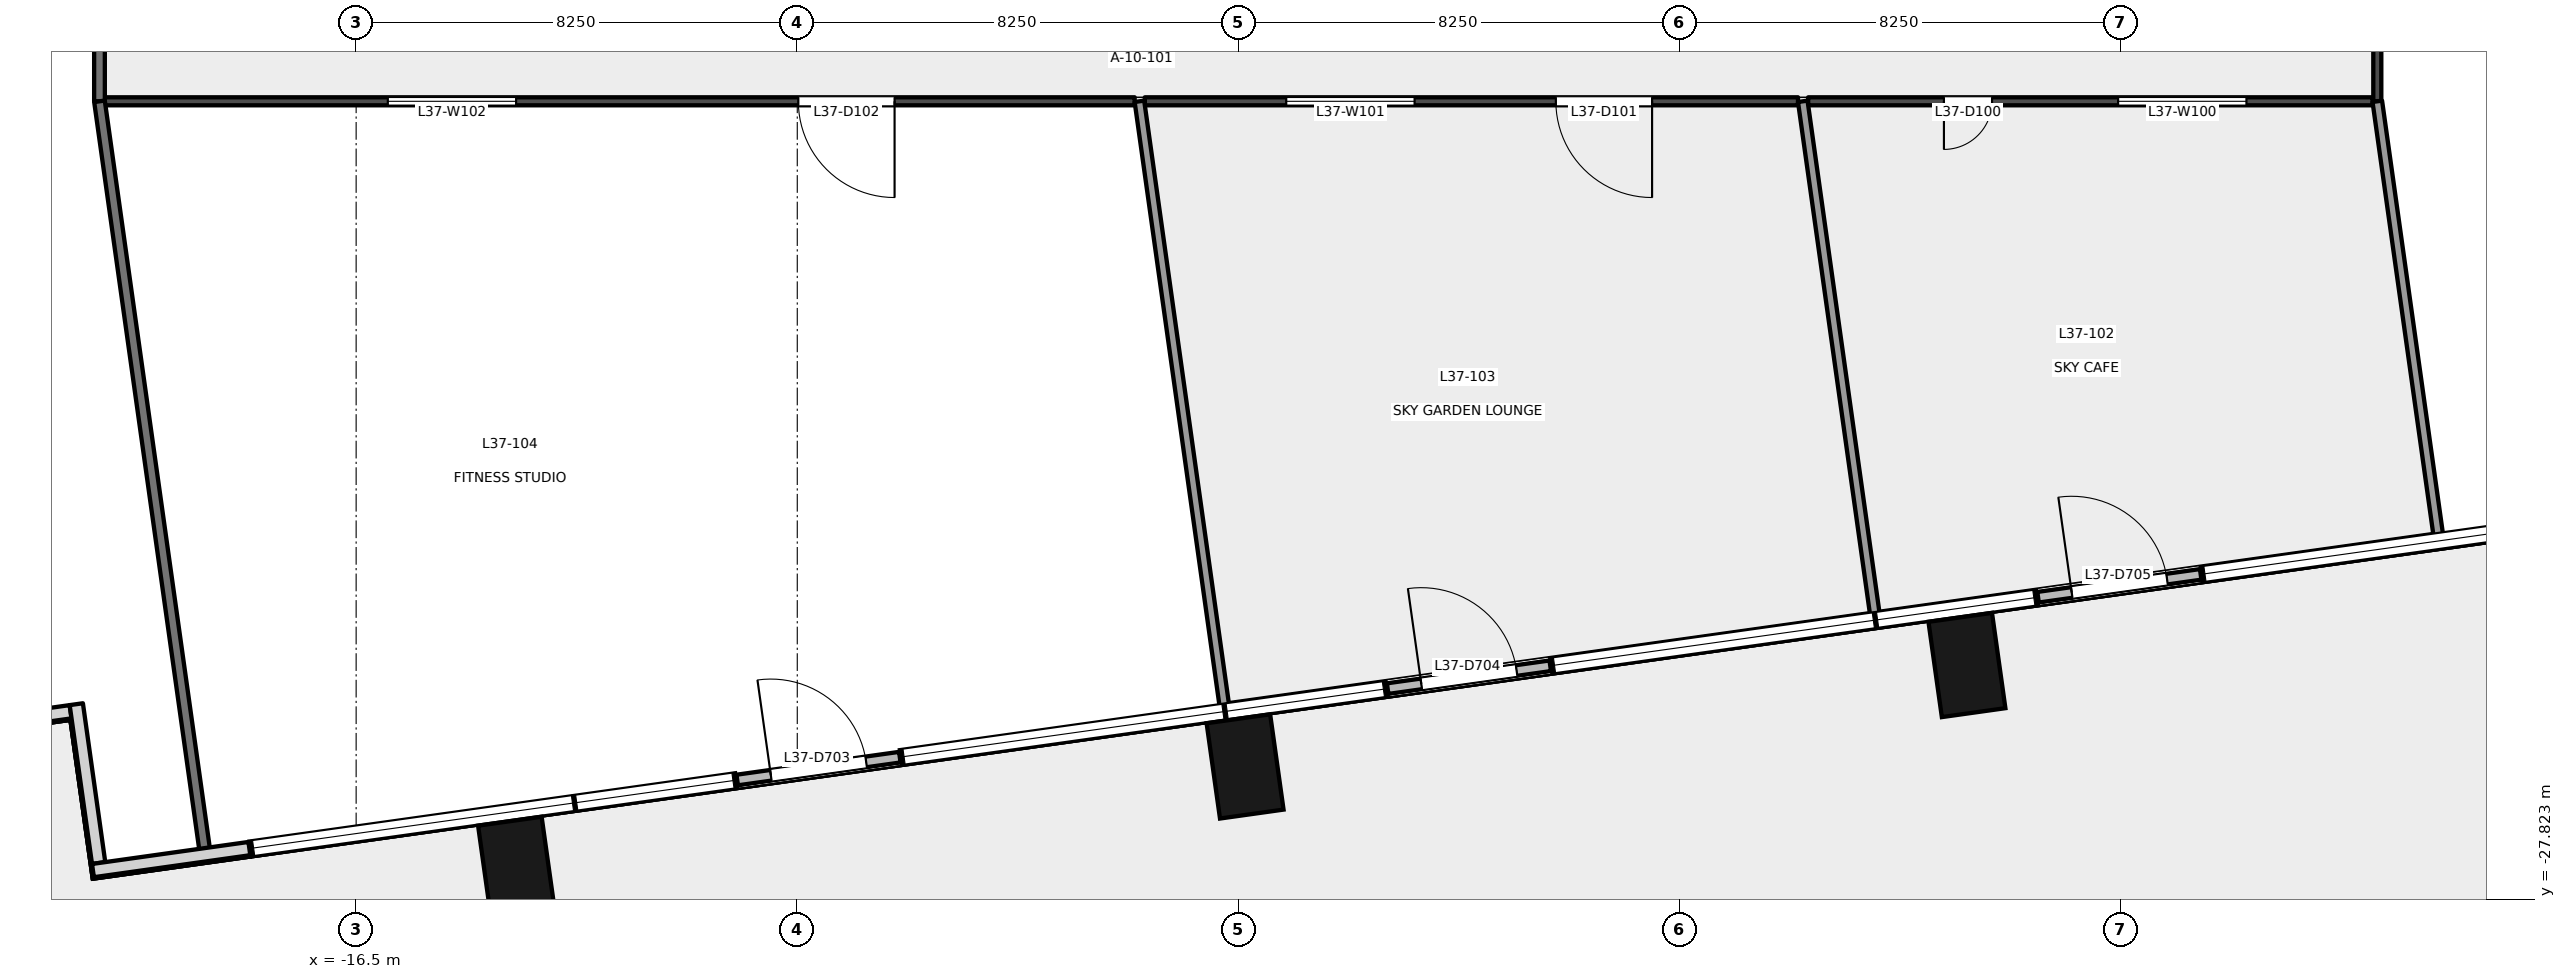
"""IFC4 building model, lengths in metres.
Left out: names, types, materials, properties, quantities, classifications, styles, units other than length and angle.
Written with IfcOpenShell. Run it as: python <this file> out.ifc"""

import sys

from ifc_helpers import new_model, si_unit, direction, frame, frame_2d, origin, origin_2d, place, context, subcontext, project, spatial, rectangle, extrude, element, fill, save


model = new_model("IFC4")
c1 = context("Model", 3, precision=1e-05, world=origin(), true_north=direction((0.0, 1.0)))
c2 = subcontext(c1, "Body", "Model", "MODEL_VIEW")
j1 = project(units=[si_unit("LENGTHUNIT", "METRE"), si_unit("PLANEANGLEUNIT", "RADIAN")], contexts=[c1])
p1 = place(None, origin())
s1 = spatial("IfcSite", under=j1, at=p1, CompositionType="ELEMENT")
p2 = place(p1, origin())
s2 = spatial("IfcBuilding", under=s1, at=p2, CompositionType="ELEMENT")
p3 = place(p2, frame((0.0, 0.0, 163.1)))
s3 = spatial("IfcBuildingStorey", under=s2, at=p3, CompositionType="ELEMENT", Elevation=163.1)
for number, where, z_axis, x_axis in (
    (1, (-13.5, -27.256, -0.2), (0.0, 0.0, 1.0), (0.99, 0.139, 0.0)),
    (2, (0.125, -25.34, -0.2), (0.0, 0.0, 1.0), (0.99, 0.139, 0.0)),
    (3, (13.625, -23.443, -0.2), (0.0, 0.0, 1.0), (0.99, 0.139, 0.0)),
):
    element("IfcColumn", number, at=place(p3, frame(where, z_axis=z_axis, x_axis=x_axis)), inside=s3, PredefinedType="COLUMN", context=c2, shape_type="SweptSolid", body=[
        extrude(rectangle(XDim=1.2, YDim=1.8, at=origin_2d()), origin(), (0.0, 0.0, 1.0), 5.4),
    ])
p4 = place(p3, frame((-23.325, -24.526, 0.0), z_axis=(0.0, 0.0, 1.0), x_axis=(0.990243596651, 0.13934711799, 0.0)))
e4 = element("IfcWall", 4, at=p4, inside=s3, PredefinedType="SOLIDWALL", context=c2, shape_type="SweptSolid", body=[
    extrude(rectangle(XDim=1.5, YDim=0.25, at=frame_2d((0.75, 0.0))), origin(), (0.0, 0.0, 1.0), 5.2),
])
p5 = place(p3, frame((-21.734, -24.176, 0.0), z_axis=(0.0, 0.0, 1.0), x_axis=(0.139313431826, -0.990248336385, 0.0)))
e5 = element("IfcWall", 5, at=p5, inside=s3, PredefinedType="SOLIDWALL", context=c2, shape_type="SweptSolid", body=[
    extrude(rectangle(XDim=3.0, YDim=0.25, at=frame_2d((1.5, 0.0))), origin(), (0.0, 0.0, 1.0), 5.2),
])
p6 = place(p3, frame((-21.422, -27.288, 0.0), z_axis=(0.0, 0.0, 1.0), x_axis=(0.990246427036, 0.139327002919, 0.0)))
e6 = element("IfcWall", 6, at=p6, inside=s3, PredefinedType="SOLIDWALL", context=c2, shape_type="SweptSolid", body=[
    extrude(rectangle(XDim=2.954, YDim=0.25, at=frame_2d((1.477, 0.0))), origin(), (0.0, 0.0, 1.0), 5.2),
])
p7 = place(p3, frame((-9.373, -25.594, 0.0), z_axis=(0.0, 0.0, 1.0), x_axis=(0.990274385837, 0.139128145088, 0.0)))
e7 = element("IfcWall", 7, at=p7, inside=s3, PredefinedType="SOLIDWALL", context=c2, shape_type="SweptSolid", body=[
    extrude(rectangle(XDim=3.071, YDim=0.2, at=frame_2d((1.535, 0.0))), origin(), (0.0, 0.0, 1.0), 4.1),
])
p8 = place(p7, frame((0.635, 0.0, 0.0)))
e8 = element("IfcOpeningElement", 8, at=p8, cuts=e7, PredefinedType="OPENING", context=c2, shape_type="SweptSolid", body=[
    extrude(rectangle(XDim=1.8, YDim=2.4, at=frame_2d((0.9, 1.2))), frame((0.0, 0.111, 0.0), z_axis=(0.0, -1.0, 0.0), x_axis=(1.0, 0.0, 0.0)), (0.0, 0.0, 1.0), 0.221),
])
p9 = place(p3, frame((2.791, -23.885, 0.0), z_axis=(0.0, 0.0, 1.0), x_axis=(0.990274385837, 0.139128145088, 0.0)))
e9 = element("IfcWall", 9, at=p9, inside=s3, PredefinedType="SOLIDWALL", context=c2, shape_type="SweptSolid", body=[
    extrude(rectangle(XDim=3.071, YDim=0.2, at=frame_2d((1.535, 0.0))), origin(), (0.0, 0.0, 1.0), 4.1),
])
p10 = place(p9, frame((0.635, 0.0, 0.0)))
e10 = element("IfcOpeningElement", 10, at=p10, cuts=e9, PredefinedType="OPENING", context=c2, shape_type="SweptSolid", body=[
    extrude(rectangle(XDim=1.8, YDim=2.4, at=frame_2d((0.9, 1.2))), frame((0.0, 0.111, 0.0), z_axis=(0.0, -1.0, 0.0), x_axis=(1.0, 0.0, 0.0)), (0.0, 0.0, 1.0), 0.221),
])
p11 = place(p3, frame((14.956, -22.176, 0.0), z_axis=(0.0, 0.0, 1.0), x_axis=(0.990275924543, 0.139117192578, 0.0)))
e11 = element("IfcWall", 11, at=p11, inside=s3, PredefinedType="SOLIDWALL", context=c2, shape_type="SweptSolid", body=[
    extrude(rectangle(XDim=3.071, YDim=0.2, at=frame_2d((1.536, 0.0))), origin(), (0.0, 0.0, 1.0), 4.1),
])
p12 = place(p11, frame((0.635, 0.0, 0.0)))
e12 = element("IfcOpeningElement", 12, at=p12, cuts=e11, PredefinedType="OPENING", context=c2, shape_type="SweptSolid", body=[
    extrude(rectangle(XDim=1.8, YDim=2.4, at=frame_2d((0.9, 1.2))), frame((0.0, 0.111, 0.0), z_axis=(0.0, -1.0, 0.0), x_axis=(1.0, 0.0, 0.0)), (0.0, 0.0, 1.0), 0.221),
])
p13 = place(p3, frame((21.211, -12.9, 0.0), z_axis=(0.0, 0.0, 1.0), x_axis=(-1.0, 0.0, 0.0)))
e13 = element("IfcWall", 13, at=p13, inside=s3, PredefinedType="PARTITIONING", context=c2, shape_type="SweptSolid", body=[
    extrude(rectangle(XDim=10.555, YDim=0.15, at=frame_2d((5.277, 0.0))), origin(), (0.0, 0.0, 1.0), 4.6),
])
p14 = place(p13, frame((7.116, 0.0, 0.0)))
e14 = element("IfcOpeningElement", 14, at=p14, cuts=e13, PredefinedType="OPENING", context=c2, shape_type="SweptSolid", body=[
    extrude(rectangle(XDim=0.9, YDim=2.1, at=frame_2d((0.45, 1.05))), frame((0.0, 0.085, 0.0), z_axis=(0.0, -1.0, 0.0), x_axis=(1.0, 0.0, 0.0)), (0.0, 0.0, 1.0), 0.171),
])
p15 = place(p13, frame((2.358, 0.0, 0.0)))
e15 = element("IfcOpeningElement", 15, at=p15, cuts=e13, PredefinedType="OPENING", context=c2, shape_type="SweptSolid", body=[
    extrude(rectangle(XDim=2.4, YDim=2.4, at=frame_2d((1.2, 1.2))), frame((0.0, 0.085, 0.0), z_axis=(0.0, -1.0, 0.0), x_axis=(1.0, 0.0, 0.0)), (0.0, 0.0, 1.0), 0.171),
])
p16 = place(p3, frame((10.466, -12.9, 0.0), z_axis=(0.0, 0.0, 1.0), x_axis=(-1.0, 0.0, 0.0)))
e16 = element("IfcWall", 16, at=p16, inside=s3, PredefinedType="PARTITIONING", context=c2, shape_type="SweptSolid", body=[
    extrude(rectangle(XDim=12.216, YDim=0.15, at=frame_2d((6.108, 0.0))), origin(), (0.0, 0.0, 1.0), 4.4),
])
p17 = place(p16, frame((2.729, 0.0, 0.0)))
e17 = element("IfcOpeningElement", 17, at=p17, cuts=e16, PredefinedType="OPENING", context=c2, shape_type="SweptSolid", body=[
    extrude(rectangle(XDim=1.8, YDim=2.1, at=frame_2d((0.9, 1.05))), frame((0.0, 0.085, 0.0), z_axis=(0.0, -1.0, 0.0), x_axis=(1.0, 0.0, 0.0)), (0.0, 0.0, 1.0), 0.171),
])
p18 = place(p16, frame((7.171, 0.0, 0.0)))
e18 = element("IfcOpeningElement", 18, at=p18, cuts=e16, PredefinedType="OPENING", context=c2, shape_type="SweptSolid", body=[
    extrude(rectangle(XDim=2.4, YDim=2.4, at=frame_2d((1.2, 1.2))), frame((0.0, 0.085, 0.0), z_axis=(0.0, -1.0, 0.0), x_axis=(1.0, 0.0, 0.0)), (0.0, 0.0, 1.0), 0.171),
])
p19 = place(p3, frame((-1.94, -12.9, 0.0), z_axis=(0.0, 0.0, 1.0), x_axis=(-1.0, 0.0, 0.0)))
e19 = element("IfcWall", 19, at=p19, inside=s3, PredefinedType="PARTITIONING", context=c2, shape_type="SweptSolid", body=[
    extrude(rectangle(XDim=19.26, YDim=0.15, at=frame_2d((9.63, 0.0))), origin(), (0.0, 0.0, 1.0), 4.3),
])
p20 = place(p19, frame((4.49, 0.0, 0.0)))
e20 = element("IfcOpeningElement", 20, at=p20, cuts=e19, PredefinedType="OPENING", context=c2, shape_type="SweptSolid", body=[
    extrude(rectangle(XDim=1.8, YDim=2.1, at=frame_2d((0.9, 1.05))), frame((0.0, 0.085, 0.0), z_axis=(0.0, -1.0, 0.0), x_axis=(1.0, 0.0, 0.0)), (0.0, 0.0, 1.0), 0.171),
])
p21 = place(p19, frame((11.568, 0.0, 0.0)))
e21 = element("IfcOpeningElement", 21, at=p21, cuts=e19, PredefinedType="OPENING", context=c2, shape_type="SweptSolid", body=[
    extrude(rectangle(XDim=2.4, YDim=2.4, at=frame_2d((1.2, 1.2))), frame((0.0, 0.085, 0.0), z_axis=(0.0, -1.0, 0.0), x_axis=(1.0, 0.0, 0.0)), (0.0, 0.0, 1.0), 0.171),
])
p22 = place(p3, frame((21.3, -6.851, 0.0), z_axis=(0.0, 0.0, 1.0), x_axis=(0.0, -1.0, 0.0)))
e22 = element("IfcWall", 22, at=p22, inside=s3, PredefinedType="PARTITIONING", context=c2, shape_type="SweptSolid", body=[
    extrude(rectangle(XDim=6.049, YDim=0.15, at=frame_2d((3.024, 0.0))), origin(), (0.0, 0.0, 1.0), 5.2),
])
p23 = place(p22, frame((2.574, 0.0, 0.0)))
e23 = element("IfcOpeningElement", 23, at=p23, cuts=e22, PredefinedType="OPENING", context=c2, shape_type="SweptSolid", body=[
    extrude(rectangle(XDim=0.9, YDim=2.1, at=frame_2d((0.45, 1.05))), frame((0.0, 0.085, 0.0), z_axis=(0.0, -1.0, 0.0), x_axis=(1.0, 0.0, 0.0)), (0.0, 0.0, 1.0), 0.171),
])
p24 = place(p3, frame((-21.3, -12.9, 0.0), z_axis=(0.0, 0.0, 1.0), x_axis=(0.0, 1.0, 0.0)))
e24 = element("IfcWall", 24, at=p24, inside=s3, PredefinedType="PARTITIONING", context=c2, shape_type="SweptSolid", body=[
    extrude(rectangle(XDim=23.7, YDim=0.2, at=frame_2d((11.85, 0.0))), origin(), (0.0, 0.0, 1.0), 4.7),
])
p25 = place(p24, frame((11.4, 0.0, 0.0)))
e25 = element("IfcOpeningElement", 25, at=p25, cuts=e24, PredefinedType="OPENING", context=c2, shape_type="SweptSolid", body=[
    extrude(rectangle(XDim=0.9, YDim=2.1, at=frame_2d((0.45, 1.05))), frame((0.0, 0.111, 0.0), z_axis=(0.0, -1.0, 0.0), x_axis=(1.0, 0.0, 0.0)), (0.0, 0.0, 1.0), 0.221),
])
p26 = place(p3, frame((11.906, -22.514, 0.0), z_axis=(0.0, 0.0, 1.0), x_axis=(-0.139164284248, 0.99026930781, 0.0)))
e26 = element("IfcWall", 26, at=p26, inside=s3, PredefinedType="PARTITIONING", context=c2, shape_type="SweptSolid", body=[
    extrude(rectangle(XDim=9.708, YDim=0.18, at=frame_2d((4.854, 0.0))), origin(), (0.0, 0.0, 1.0), 5.2),
])
p27 = place(p3, frame((21.3, -12.9, 0.0), z_axis=(0.0, 0.0, 1.0), x_axis=(0.13917785753, -0.990267400238, 0.0)))
e27 = element("IfcWall", 27, at=p27, inside=s3, PredefinedType="PARTITIONING", context=c2, shape_type="SweptSolid", body=[
    extrude(rectangle(XDim=8.213, YDim=0.18, at=frame_2d((4.106, 0.0))), origin(), (0.0, 0.0, 1.0), 5.2),
])
p28 = place(p3, frame((-0.26, -24.223, 0.0), z_axis=(0.0, 0.0, 1.0), x_axis=(-0.139149160805, 0.990271433016, 0.0)))
e28 = element("IfcWall", 28, at=p28, inside=s3, PredefinedType="PARTITIONING", context=c2, shape_type="SweptSolid", body=[
    extrude(rectangle(XDim=11.434, YDim=0.18, at=frame_2d((5.717, 0.0))), origin(), (0.0, 0.0, 1.0), 5.2),
])
p29 = place(p3, frame((-19.332, -26.903, 0.0), z_axis=(0.0, 0.0, 1.0), x_axis=(-0.139173089853, 0.990268070303, 0.0)))
e29 = element("IfcWall", 29, at=p29, inside=s3, PredefinedType="PARTITIONING", context=c2, shape_type="SweptSolid", body=[
    extrude(rectangle(XDim=14.141, YDim=0.2, at=frame_2d((7.07, 0.0))), origin(), (0.0, 0.0, 1.0), 5.2),
])
p30 = place(p8, origin())
e30 = element("IfcDoor", 30, at=p30, inside=s3, OperationType="DOUBLE_DOOR_SINGLE_SWING", PredefinedType="DOOR", context=c2, shape_type="SweptSolid", body=[
    extrude(rectangle(XDim=1.8, YDim=2.4, at=frame_2d((0.9, 1.2))), frame((0.0, 0.025, 0.0), z_axis=(0.0, -1.0, 0.0), x_axis=(1.0, 0.0, 0.0)), (0.0, 0.0, 1.0), 0.05),
])
fill(e8, e30)
p31 = place(p10, origin())
e31 = element("IfcDoor", 31, at=p31, inside=s3, OperationType="DOUBLE_DOOR_SINGLE_SWING", PredefinedType="DOOR", context=c2, shape_type="SweptSolid", body=[
    extrude(rectangle(XDim=1.8, YDim=2.4, at=frame_2d((0.9, 1.2))), frame((0.0, 0.025, 0.0), z_axis=(0.0, -1.0, 0.0), x_axis=(1.0, 0.0, 0.0)), (0.0, 0.0, 1.0), 0.05),
])
fill(e10, e31)
p32 = place(p12, origin())
e32 = element("IfcDoor", 32, at=p32, inside=s3, OperationType="DOUBLE_DOOR_SINGLE_SWING", PredefinedType="DOOR", context=c2, shape_type="SweptSolid", body=[
    extrude(rectangle(XDim=1.8, YDim=2.4, at=frame_2d((0.9, 1.2))), frame((0.0, 0.025, 0.0), z_axis=(0.0, -1.0, 0.0), x_axis=(1.0, 0.0, 0.0)), (0.0, 0.0, 1.0), 0.05),
])
fill(e12, e32)
p33 = place(p14, origin())
e33 = element("IfcDoor", 33, at=p33, inside=s3, OperationType="SINGLE_SWING_RIGHT", PredefinedType="DOOR", context=c2, shape_type="SweptSolid", body=[
    extrude(rectangle(XDim=0.9, YDim=2.1, at=frame_2d((0.45, 1.05))), frame((0.0, 0.025, 0.0), z_axis=(0.0, -1.0, 0.0), x_axis=(1.0, 0.0, 0.0)), (0.0, 0.0, 1.0), 0.05),
])
fill(e14, e33)
p34 = place(p17, origin())
e34 = element("IfcDoor", 34, at=p34, inside=s3, OperationType="DOUBLE_DOOR_SINGLE_SWING", PredefinedType="DOOR", context=c2, shape_type="SweptSolid", body=[
    extrude(rectangle(XDim=1.8, YDim=2.1, at=frame_2d((0.9, 1.05))), frame((0.0, 0.025, 0.0), z_axis=(0.0, -1.0, 0.0), x_axis=(1.0, 0.0, 0.0)), (0.0, 0.0, 1.0), 0.05),
])
fill(e17, e34)
p35 = place(p20, origin())
e35 = element("IfcDoor", 35, at=p35, inside=s3, OperationType="DOUBLE_DOOR_SINGLE_SWING", PredefinedType="DOOR", context=c2, shape_type="SweptSolid", body=[
    extrude(rectangle(XDim=1.8, YDim=2.1, at=frame_2d((0.9, 1.05))), frame((0.0, 0.025, 0.0), z_axis=(0.0, -1.0, 0.0), x_axis=(1.0, 0.0, 0.0)), (0.0, 0.0, 1.0), 0.05),
])
fill(e20, e35)
p36 = place(p15, origin())
e36 = element("IfcWindow", 36, at=p36, inside=s3, PartitioningType="SINGLE_PANEL", PredefinedType="WINDOW", context=c2, shape_type="SweptSolid", body=[
    extrude(rectangle(XDim=2.4, YDim=2.4, at=frame_2d((1.2, 1.2))), frame((0.0, 0.03, 0.0), z_axis=(0.0, -1.0, 0.0), x_axis=(1.0, 0.0, 0.0)), (0.0, 0.0, 1.0), 0.06),
])
fill(e15, e36)
p37 = place(p18, origin())
e37 = element("IfcWindow", 37, at=p37, inside=s3, PartitioningType="SINGLE_PANEL", PredefinedType="WINDOW", context=c2, shape_type="SweptSolid", body=[
    extrude(rectangle(XDim=2.4, YDim=2.4, at=frame_2d((1.2, 1.2))), frame((0.0, 0.03, 0.0), z_axis=(0.0, -1.0, 0.0), x_axis=(1.0, 0.0, 0.0)), (0.0, 0.0, 1.0), 0.06),
])
fill(e18, e37)
p38 = place(p21, origin())
e38 = element("IfcWindow", 38, at=p38, inside=s3, PartitioningType="SINGLE_PANEL", PredefinedType="WINDOW", context=c2, shape_type="SweptSolid", body=[
    extrude(rectangle(XDim=2.4, YDim=2.4, at=frame_2d((1.2, 1.2))), frame((0.0, 0.03, 0.0), z_axis=(0.0, -1.0, 0.0), x_axis=(1.0, 0.0, 0.0)), (0.0, 0.0, 1.0), 0.06),
])
fill(e21, e38)
save(model, sys.argv[1])
